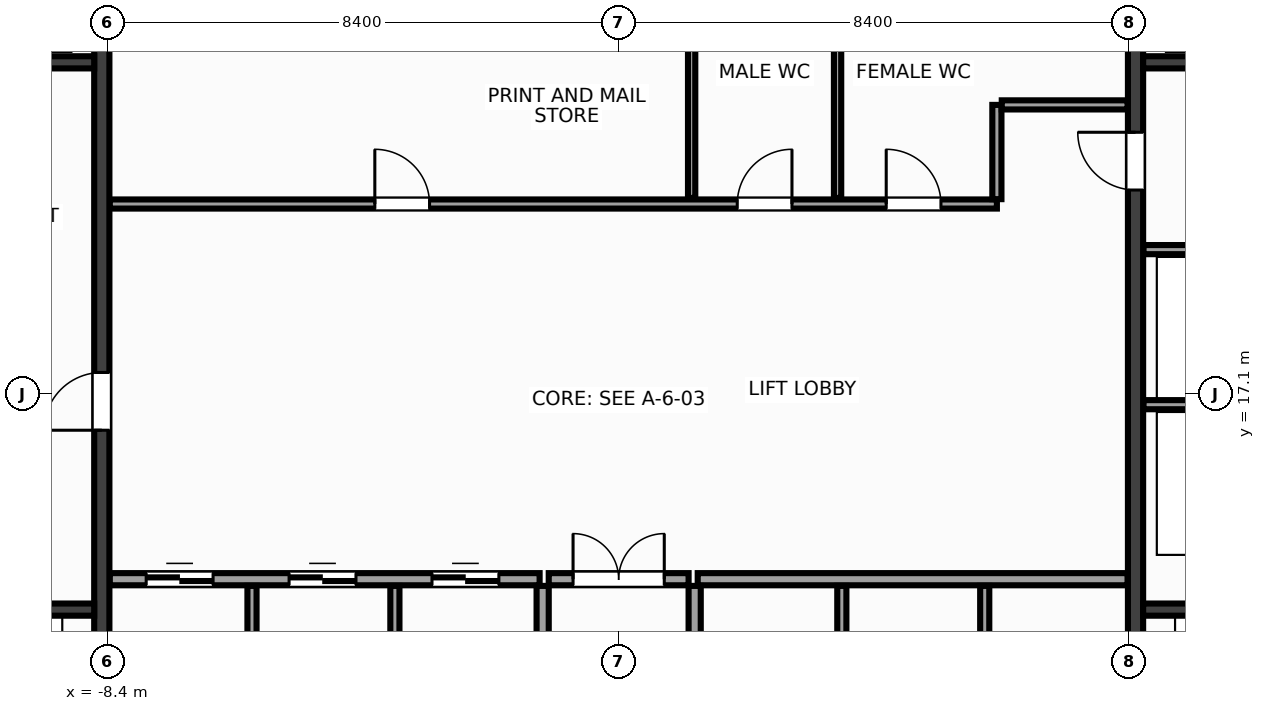
"""IFC4 building model, lengths in metres.
Left out: names, types, materials, properties, quantities, classifications, styles, units other than length and angle.
Written with IfcOpenShell. Run it as: python <this file> out.ifc"""

import sys

from ifc_helpers import new_model, si_unit, direction, frame, frame_2d, origin, place, context, subcontext, project, spatial, rectangle, extrude, source, transform, mapped, element, fill, save


model = new_model("IFC4")
c1 = context("Model", 3, precision=1e-05, world=origin(), true_north=direction((0.0, 1.0)))
c2 = subcontext(c1, "Body", "Model", "MODEL_VIEW")
j1 = project(units=[si_unit("LENGTHUNIT", "METRE"), si_unit("PLANEANGLEUNIT", "RADIAN")], contexts=[c1])
p1 = place(None, origin())
s1 = spatial("IfcSite", under=j1, at=p1, CompositionType="ELEMENT")
p2 = place(p1, origin())
s2 = spatial("IfcBuilding", under=s1, at=p2, CompositionType="ELEMENT")
p3 = place(p2, frame((0.0, 0.0, 45.2)))
s3 = spatial("IfcBuildingStorey", under=s2, at=p3, CompositionType="ELEMENT", Elevation=45.2)
m1 = source(origin(), c2, "Body", "SweptSolid", [
    extrude(rectangle(XDim=12.8, YDim=0.25, at=frame_2d((6.4, 0.0))), origin(), (0.0, 0.0, 1.0), 3.6),
])
p4 = place(p3, frame((-8.5, 10.6, 0.0), z_axis=(0.0, 0.0, 1.0), x_axis=(0.0, 1.0, 0.0)))
e1 = element("IfcWall", 1, at=p4, inside=s3, PredefinedType="SHEAR", context=c2, shape_type="MappedRepresentation", body=[
    mapped(m1, transform((0.0, 0.0, 0.0), x_axis=(1.0, 0.0, 0.0), y_axis=(0.0, 1.0, 0.0), z_axis=(0.0, 0.0, 1.0), scale=1.0)),
])
p5 = place(p4, frame((5.9, 0.0, 0.0)))
e2 = element("IfcOpeningElement", 2, at=p5, cuts=e1, PredefinedType="OPENING", context=c2, shape_type="SweptSolid", body=[
    extrude(rectangle(XDim=0.95, YDim=2.15, at=frame_2d((0.475, 1.075))), frame((0.0, 0.137, 0.0), z_axis=(0.0, -1.0, 0.0), x_axis=(1.0, 0.0, 0.0)), (0.0, 0.0, 1.0), 0.274),
])
p6 = place(p3, frame((8.5, 10.6, 0.0), z_axis=(0.0, 0.0, 1.0), x_axis=(0.0, 1.0, 0.0)))
e3 = element("IfcWall", 3, at=p6, inside=s3, PredefinedType="SHEAR", context=c2, shape_type="MappedRepresentation", body=[
    mapped(m1, transform((0.0, 0.0, 0.0), x_axis=(1.0, 0.0, 0.0), y_axis=(0.0, 1.0, 0.0), z_axis=(0.0, 0.0, 1.0), scale=1.0)),
])
p7 = place(p6, frame((9.85, 0.0, 0.0)))
e4 = element("IfcOpeningElement", 4, at=p7, cuts=e3, PredefinedType="OPENING", context=c2, shape_type="SweptSolid", body=[
    extrude(rectangle(XDim=0.95, YDim=2.15, at=frame_2d((0.475, 1.075))), frame((0.0, 0.137, 0.0), z_axis=(0.0, -1.0, 0.0), x_axis=(1.0, 0.0, 0.0)), (0.0, 0.0, 1.0), 0.274),
])
m2 = source(origin(), c2, "Body", "SweptSolid", [
    extrude(rectangle(XDim=2.825, YDim=0.2, at=frame_2d((1.413, 0.0))), origin(), (0.0, 0.0, 1.0), 3.6),
])
for number, where, z_axis, x_axis in (
    (5, (-11.45, 13.55, 0.0), (0.0, 0.0, 1.0), (1.0, 0.0, 0.0)),
    (6, (8.625, 13.55, 0.0), (0.0, 0.0, 1.0), (1.0, 0.0, 0.0)),
):
    element("IfcWall", number, at=place(p3, frame(where, z_axis=z_axis, x_axis=x_axis)), inside=s3, PredefinedType="SHEAR", context=c2, shape_type="MappedRepresentation", body=[
        mapped(m2, transform((0.0, 0.0, 0.0), x_axis=(1.0, 0.0, 0.0), y_axis=(0.0, 1.0, 0.0), z_axis=(0.0, 0.0, 1.0), scale=1.0)),
    ])
m3 = source(origin(), c2, "Body", "SweptSolid", [
    extrude(rectangle(XDim=3.02, YDim=0.2, at=frame_2d((1.51, 0.0))), origin(), (0.0, 0.0, 1.0), 3.6),
])
for number, where, z_axis, x_axis in (
    (7, (-11.645, 22.55, 0.0), (0.0, 0.0, 1.0), (1.0, 0.0, 0.0)),
    (8, (8.625, 22.55, 0.0), (0.0, 0.0, 1.0), (1.0, 0.0, 0.0)),
):
    element("IfcWall", number, at=place(p3, frame(where, z_axis=z_axis, x_axis=x_axis)), inside=s3, PredefinedType="SHEAR", context=c2, shape_type="MappedRepresentation", body=[
        mapped(m3, transform((0.0, 0.0, 0.0), x_axis=(1.0, 0.0, 0.0), y_axis=(0.0, 1.0, 0.0), z_axis=(0.0, 0.0, 1.0), scale=1.0)),
    ])
m4 = source(origin(), c2, "Body", "SweptSolid", [
    extrude(rectangle(XDim=3.01, YDim=0.15, at=frame_2d((1.505, 0.0))), origin(), (0.0, 0.0, 1.0), 3.36),
])
for number, where, z_axis, x_axis in (
    (9, (8.63, 16.92, 0.0), (0.0, 0.0, 1.0), (1.0, 0.0, 0.0)),
    (10, (8.63, 19.47, 0.0), (0.0, 0.0, 1.0), (1.0, 0.0, 0.0)),
):
    element("IfcWall", number, at=place(p3, frame(where, z_axis=z_axis, x_axis=x_axis)), inside=s3, PredefinedType="PARTITIONING", context=c2, shape_type="MappedRepresentation", body=[
        mapped(m4, transform((0.0, 0.0, 0.0), x_axis=(1.0, 0.0, 0.0), y_axis=(0.0, 1.0, 0.0), z_axis=(0.0, 0.0, 1.0), scale=1.0)),
    ])
m5 = source(origin(), c2, "Body", "SweptSolid", [
    extrude(rectangle(XDim=7.07, YDim=0.2, at=frame_2d((3.535, 0.0))), origin(), (0.0, 0.0, 1.0), 3.36),
])
p8 = place(p3, frame((-8.37, 14.05, 0.0), z_axis=(0.0, 0.0, 1.0), x_axis=(1.0, 0.0, 0.0)))
e11 = element("IfcWall", 11, at=p8, inside=s3, PredefinedType="PARTITIONING", context=c2, shape_type="MappedRepresentation", body=[
    mapped(m5, transform((0.0, 0.0, 0.0), x_axis=(1.0, 0.0, 0.0), y_axis=(0.0, 1.0, 0.0), z_axis=(0.0, 0.0, 1.0), scale=1.0)),
])
p9 = place(p8, frame((0.6, 0.0, 0.0)))
e12 = element("IfcOpeningElement", 12, at=p9, cuts=e11, PredefinedType="OPENING", context=c2, shape_type="SweptSolid", body=[
    extrude(rectangle(XDim=1.1, YDim=2.15, at=frame_2d((0.55, 1.075))), frame((0.0, 0.112, 0.0), z_axis=(0.0, -1.0, 0.0), x_axis=(1.0, 0.0, 0.0)), (0.0, 0.0, 1.0), 0.224),
])
p10 = place(p8, frame((2.95, 0.0, 0.0)))
e13 = element("IfcOpeningElement", 13, at=p10, cuts=e11, PredefinedType="OPENING", context=c2, shape_type="SweptSolid", body=[
    extrude(rectangle(XDim=1.1, YDim=2.15, at=frame_2d((0.55, 1.075))), frame((0.0, 0.112, 0.0), z_axis=(0.0, -1.0, 0.0), x_axis=(1.0, 0.0, 0.0)), (0.0, 0.0, 1.0), 0.224),
])
p11 = place(p8, frame((5.3, 0.0, 0.0)))
e14 = element("IfcOpeningElement", 14, at=p11, cuts=e11, PredefinedType="OPENING", context=c2, shape_type="SweptSolid", body=[
    extrude(rectangle(XDim=1.1, YDim=2.15, at=frame_2d((0.55, 1.075))), frame((0.0, 0.112, 0.0), z_axis=(0.0, -1.0, 0.0), x_axis=(1.0, 0.0, 0.0)), (0.0, 0.0, 1.0), 0.224),
])
p12 = place(p3, frame((1.3, 14.05, 0.0), z_axis=(0.0, 0.0, 1.0), x_axis=(1.0, 0.0, 0.0)))
e15 = element("IfcWall", 15, at=p12, inside=s3, PredefinedType="PARTITIONING", context=c2, shape_type="MappedRepresentation", body=[
    mapped(m5, transform((0.0, 0.0, 0.0), x_axis=(1.0, 0.0, 0.0), y_axis=(0.0, 1.0, 0.0), z_axis=(0.0, 0.0, 1.0), scale=1.0)),
])
m6 = source(origin(), c2, "Body", "SweptSolid", [
    extrude(rectangle(XDim=3.34, YDim=0.2, at=frame_2d((1.67, 0.0))), origin(), (0.0, 0.0, 1.0), 3.36),
])
for number, where, z_axis, x_axis in (
    (16, (-1.25, 10.6, 0.0), (0.0, 0.0, 1.0), (0.0, 1.0, 0.0)),
    (17, (1.25, 10.6, 0.0), (0.0, 0.0, 1.0), (0.0, 1.0, 0.0)),
):
    element("IfcWall", number, at=place(p3, frame(where, z_axis=z_axis, x_axis=x_axis)), inside=s3, PredefinedType="PARTITIONING", context=c2, shape_type="MappedRepresentation", body=[
        mapped(m6, transform((0.0, 0.0, 0.0), x_axis=(1.0, 0.0, 0.0), y_axis=(0.0, 1.0, 0.0), z_axis=(0.0, 0.0, 1.0), scale=1.0)),
    ])
m7 = source(origin(), c2, "Body", "SweptSolid", [
    extrude(rectangle(XDim=2.3, YDim=0.2, at=frame_2d((1.15, 0.0))), origin(), (0.0, 0.0, 1.0), 3.36),
])
p13 = place(p3, frame((-1.15, 14.05, 0.0), z_axis=(0.0, 0.0, 1.0), x_axis=(1.0, 0.0, 0.0)))
e18 = element("IfcWall", 18, at=p13, inside=s3, PredefinedType="PARTITIONING", context=c2, shape_type="MappedRepresentation", body=[
    mapped(m7, transform((0.0, 0.0, 0.0), x_axis=(1.0, 0.0, 0.0), y_axis=(0.0, 1.0, 0.0), z_axis=(0.0, 0.0, 1.0), scale=1.0)),
])
p14 = place(p13, frame((0.4, 0.0, 0.0)))
e19 = element("IfcOpeningElement", 19, at=p14, cuts=e18, PredefinedType="OPENING", context=c2, shape_type="SweptSolid", body=[
    extrude(rectangle(XDim=1.5, YDim=2.2, at=frame_2d((0.75, 1.1))), frame((0.0, 0.112, 0.0), z_axis=(0.0, -1.0, 0.0), x_axis=(1.0, 0.0, 0.0)), (0.0, 0.0, 1.0), 0.224),
])
m8 = source(origin(), c2, "Body", "SweptSolid", [
    extrude(rectangle(XDim=14.59, YDim=0.15, at=frame_2d((7.295, 0.0))), origin(), (0.0, 0.0, 1.0), 3.36),
])
p15 = place(p3, frame((-8.37, 20.22, 0.0), z_axis=(0.0, 0.0, 1.0), x_axis=(1.0, 0.0, 0.0)))
e20 = element("IfcWall", 20, at=p15, inside=s3, PredefinedType="PARTITIONING", context=c2, shape_type="MappedRepresentation", body=[
    mapped(m8, transform((0.0, 0.0, 0.0), x_axis=(1.0, 0.0, 0.0), y_axis=(0.0, 1.0, 0.0), z_axis=(0.0, 0.0, 1.0), scale=1.0)),
])
p16 = place(p15, frame((4.36, 0.0, 0.0)))
e21 = element("IfcOpeningElement", 21, at=p16, cuts=e20, PredefinedType="OPENING", context=c2, shape_type="SweptSolid", body=[
    extrude(rectangle(XDim=0.9, YDim=2.15, at=frame_2d((0.45, 1.075))), frame((0.0, 0.087, 0.0), z_axis=(0.0, -1.0, 0.0), x_axis=(1.0, 0.0, 0.0)), (0.0, 0.0, 1.0), 0.174),
])
p17 = place(p15, frame((10.32, 0.0, 0.0)))
e22 = element("IfcOpeningElement", 22, at=p17, cuts=e20, PredefinedType="OPENING", context=c2, shape_type="SweptSolid", body=[
    extrude(rectangle(XDim=0.9, YDim=2.15, at=frame_2d((0.45, 1.075))), frame((0.0, 0.087, 0.0), z_axis=(0.0, -1.0, 0.0), x_axis=(1.0, 0.0, 0.0)), (0.0, 0.0, 1.0), 0.174),
])
p18 = place(p15, frame((12.77, 0.0, 0.0)))
e23 = element("IfcOpeningElement", 23, at=p18, cuts=e20, PredefinedType="OPENING", context=c2, shape_type="SweptSolid", body=[
    extrude(rectangle(XDim=0.9, YDim=2.15, at=frame_2d((0.45, 1.075))), frame((0.0, 0.087, 0.0), z_axis=(0.0, -1.0, 0.0), x_axis=(1.0, 0.0, 0.0)), (0.0, 0.0, 1.0), 0.174),
])
m9 = source(origin(), c2, "Body", "SweptSolid", [
    extrude(rectangle(XDim=1.55, YDim=0.15, at=frame_2d((0.775, 0.0))), origin(), (0.0, 0.0, 1.0), 3.36),
])
p19 = place(p3, frame((6.22, 20.3, 0.0), z_axis=(0.0, 0.0, 1.0), x_axis=(0.0, 1.0, 0.0)))
e24 = element("IfcWall", 24, at=p19, inside=s3, PredefinedType="PARTITIONING", context=c2, shape_type="MappedRepresentation", body=[
    mapped(m9, transform((0.0, 0.0, 0.0), x_axis=(1.0, 0.0, 0.0), y_axis=(0.0, 1.0, 0.0), z_axis=(0.0, 0.0, 1.0), scale=1.0)),
])
m10 = source(origin(), c2, "Body", "SweptSolid", [
    extrude(rectangle(XDim=2.07, YDim=0.15, at=frame_2d((1.035, 0.0))), origin(), (0.0, 0.0, 1.0), 3.36),
])
p20 = place(p3, frame((6.3, 21.85, 0.0), z_axis=(0.0, 0.0, 1.0), x_axis=(1.0, 0.0, 0.0)))
e25 = element("IfcWall", 25, at=p20, inside=s3, PredefinedType="PARTITIONING", context=c2, shape_type="MappedRepresentation", body=[
    mapped(m10, transform((0.0, 0.0, 0.0), x_axis=(1.0, 0.0, 0.0), y_axis=(0.0, 1.0, 0.0), z_axis=(0.0, 0.0, 1.0), scale=1.0)),
])
m11 = source(origin(), c2, "Body", "SweptSolid", [
    extrude(rectangle(XDim=3.34, YDim=0.15, at=frame_2d((1.67, 0.0))), origin(), (0.0, 0.0, 1.0), 3.36),
])
for number, where, z_axis, x_axis in (
    (26, (-6.03, 10.6, 0.0), (0.0, 0.0, 1.0), (0.0, 1.0, 0.0)),
    (27, (-3.68, 10.6, 0.0), (0.0, 0.0, 1.0), (0.0, 1.0, 0.0)),
    (28, (3.67, 10.6, 0.0), (0.0, 0.0, 1.0), (0.0, 1.0, 0.0)),
    (29, (6.02, 10.6, 0.0), (0.0, 0.0, 1.0), (0.0, 1.0, 0.0)),
):
    element("IfcWall", number, at=place(p3, frame(where, z_axis=z_axis, x_axis=x_axis)), inside=s3, PredefinedType="PARTITIONING", context=c2, shape_type="MappedRepresentation", body=[
        mapped(m11, transform((0.0, 0.0, 0.0), x_axis=(1.0, 0.0, 0.0), y_axis=(0.0, 1.0, 0.0), z_axis=(0.0, 0.0, 1.0), scale=1.0)),
    ])
m12 = source(origin(), c2, "Body", "SweptSolid", [
    extrude(rectangle(XDim=3.04, YDim=0.12, at=frame_2d((1.52, 0.0))), origin(), (0.0, 0.0, 1.0), 3.36),
])
for number, where, z_axis, x_axis in (
    (30, (1.2, 20.32, 0.0), (0.0, 0.0, 1.0), (0.0, 1.0, 0.0)),
    (31, (3.6, 20.32, 0.0), (0.0, 0.0, 1.0), (0.0, 1.0, 0.0)),
):
    element("IfcWall", number, at=place(p3, frame(where, z_axis=z_axis, x_axis=x_axis)), inside=s3, PredefinedType="PARTITIONING", context=c2, shape_type="MappedRepresentation", body=[
        mapped(m12, transform((0.0, 0.0, 0.0), x_axis=(1.0, 0.0, 0.0), y_axis=(0.0, 1.0, 0.0), z_axis=(0.0, 0.0, 1.0), scale=1.0)),
    ])
m13 = source(origin(), c2, "Body", "SweptSolid", [
    extrude(rectangle(XDim=0.95, YDim=2.15, at=frame_2d((0.475, 1.075))), frame((0.0, 0.025, 0.0), z_axis=(0.0, -1.0, 0.0), x_axis=(1.0, 0.0, 0.0)), (0.0, 0.0, 1.0), 0.05),
])
p21 = place(p5, origin())
e32 = element("IfcDoor", 32, at=p21, inside=s3, OperationType="SINGLE_SWING_LEFT", PredefinedType="DOOR", context=c2, shape_type="MappedRepresentation", body=[
    mapped(m13, transform((0.0, 0.0, 0.0), x_axis=(1.0, 0.0, 0.0), y_axis=(0.0, 1.0, 0.0), z_axis=(0.0, 0.0, 1.0), scale=1.0)),
])
fill(e2, e32)
m14 = source(origin(), c2, "Body", "SweptSolid", [
    extrude(rectangle(XDim=0.95, YDim=2.15, at=frame_2d((0.475, 1.075))), frame((0.0, 0.025, 0.0), z_axis=(0.0, -1.0, 0.0), x_axis=(1.0, 0.0, 0.0)), (0.0, 0.0, 1.0), 0.05),
])
p22 = place(p7, origin())
e33 = element("IfcDoor", 33, at=p22, inside=s3, OperationType="SINGLE_SWING_RIGHT", PredefinedType="DOOR", context=c2, shape_type="MappedRepresentation", body=[
    mapped(m14, transform((0.0, 0.0, 0.0), x_axis=(1.0, 0.0, 0.0), y_axis=(0.0, 1.0, 0.0), z_axis=(0.0, 0.0, 1.0), scale=1.0)),
])
fill(e4, e33)
m15 = source(origin(), c2, "Body", "SweptSolid", [
    extrude(rectangle(XDim=1.1, YDim=2.15, at=frame_2d((0.55, 1.075))), frame((0.0, 0.025, 0.0), z_axis=(0.0, -1.0, 0.0), x_axis=(1.0, 0.0, 0.0)), (0.0, 0.0, 1.0), 0.05),
])
p23 = place(p9, origin())
e34 = element("IfcDoor", 34, at=p23, inside=s3, OperationType="DOUBLE_DOOR_SLIDING", PredefinedType="DOOR", context=c2, shape_type="MappedRepresentation", body=[
    mapped(m15, transform((0.0, 0.0, 0.0), x_axis=(1.0, 0.0, 0.0), y_axis=(0.0, 1.0, 0.0), z_axis=(0.0, 0.0, 1.0), scale=1.0)),
])
fill(e12, e34)
p24 = place(p10, origin())
e35 = element("IfcDoor", 35, at=p24, inside=s3, OperationType="DOUBLE_DOOR_SLIDING", PredefinedType="DOOR", context=c2, shape_type="MappedRepresentation", body=[
    mapped(m15, transform((0.0, 0.0, 0.0), x_axis=(1.0, 0.0, 0.0), y_axis=(0.0, 1.0, 0.0), z_axis=(0.0, 0.0, 1.0), scale=1.0)),
])
fill(e13, e35)
p25 = place(p11, origin())
e36 = element("IfcDoor", 36, at=p25, inside=s3, OperationType="DOUBLE_DOOR_SLIDING", PredefinedType="DOOR", context=c2, shape_type="MappedRepresentation", body=[
    mapped(m15, transform((0.0, 0.0, 0.0), x_axis=(1.0, 0.0, 0.0), y_axis=(0.0, 1.0, 0.0), z_axis=(0.0, 0.0, 1.0), scale=1.0)),
])
fill(e14, e36)
m16 = source(origin(), c2, "Body", "SweptSolid", [
    extrude(rectangle(XDim=1.5, YDim=2.2, at=frame_2d((0.75, 1.1))), frame((0.0, 0.025, 0.0), z_axis=(0.0, -1.0, 0.0), x_axis=(1.0, 0.0, 0.0)), (0.0, 0.0, 1.0), 0.05),
])
p26 = place(p14, origin())
e37 = element("IfcDoor", 37, at=p26, inside=s3, OperationType="DOUBLE_DOOR_SINGLE_SWING", PredefinedType="DOOR", context=c2, shape_type="MappedRepresentation", body=[
    mapped(m16, transform((0.0, 0.0, 0.0), x_axis=(1.0, 0.0, 0.0), y_axis=(0.0, 1.0, 0.0), z_axis=(0.0, 0.0, 1.0), scale=1.0)),
])
fill(e19, e37)
m17 = source(origin(), c2, "Body", "SweptSolid", [
    extrude(rectangle(XDim=0.9, YDim=2.15, at=frame_2d((0.45, 1.075))), frame((0.0, 0.025, 0.0), z_axis=(0.0, -1.0, 0.0), x_axis=(1.0, 0.0, 0.0)), (0.0, 0.0, 1.0), 0.05),
])
p27 = place(p16, origin())
e38 = element("IfcDoor", 38, at=p27, inside=s3, OperationType="SINGLE_SWING_LEFT", PredefinedType="DOOR", context=c2, shape_type="MappedRepresentation", body=[
    mapped(m17, transform((0.0, 0.0, 0.0), x_axis=(1.0, 0.0, 0.0), y_axis=(0.0, 1.0, 0.0), z_axis=(0.0, 0.0, 1.0), scale=1.0)),
])
fill(e21, e38)
p28 = place(p17, origin())
e39 = element("IfcDoor", 39, at=p28, inside=s3, OperationType="SINGLE_SWING_RIGHT", PredefinedType="DOOR", context=c2, shape_type="MappedRepresentation", body=[
    mapped(m17, transform((0.0, 0.0, 0.0), x_axis=(1.0, 0.0, 0.0), y_axis=(0.0, 1.0, 0.0), z_axis=(0.0, 0.0, 1.0), scale=1.0)),
])
fill(e22, e39)
p29 = place(p18, origin())
e40 = element("IfcDoor", 40, at=p29, inside=s3, OperationType="SINGLE_SWING_LEFT", PredefinedType="DOOR", context=c2, shape_type="MappedRepresentation", body=[
    mapped(m17, transform((0.0, 0.0, 0.0), x_axis=(1.0, 0.0, 0.0), y_axis=(0.0, 1.0, 0.0), z_axis=(0.0, 0.0, 1.0), scale=1.0)),
])
fill(e23, e40)
save(model, sys.argv[1])
